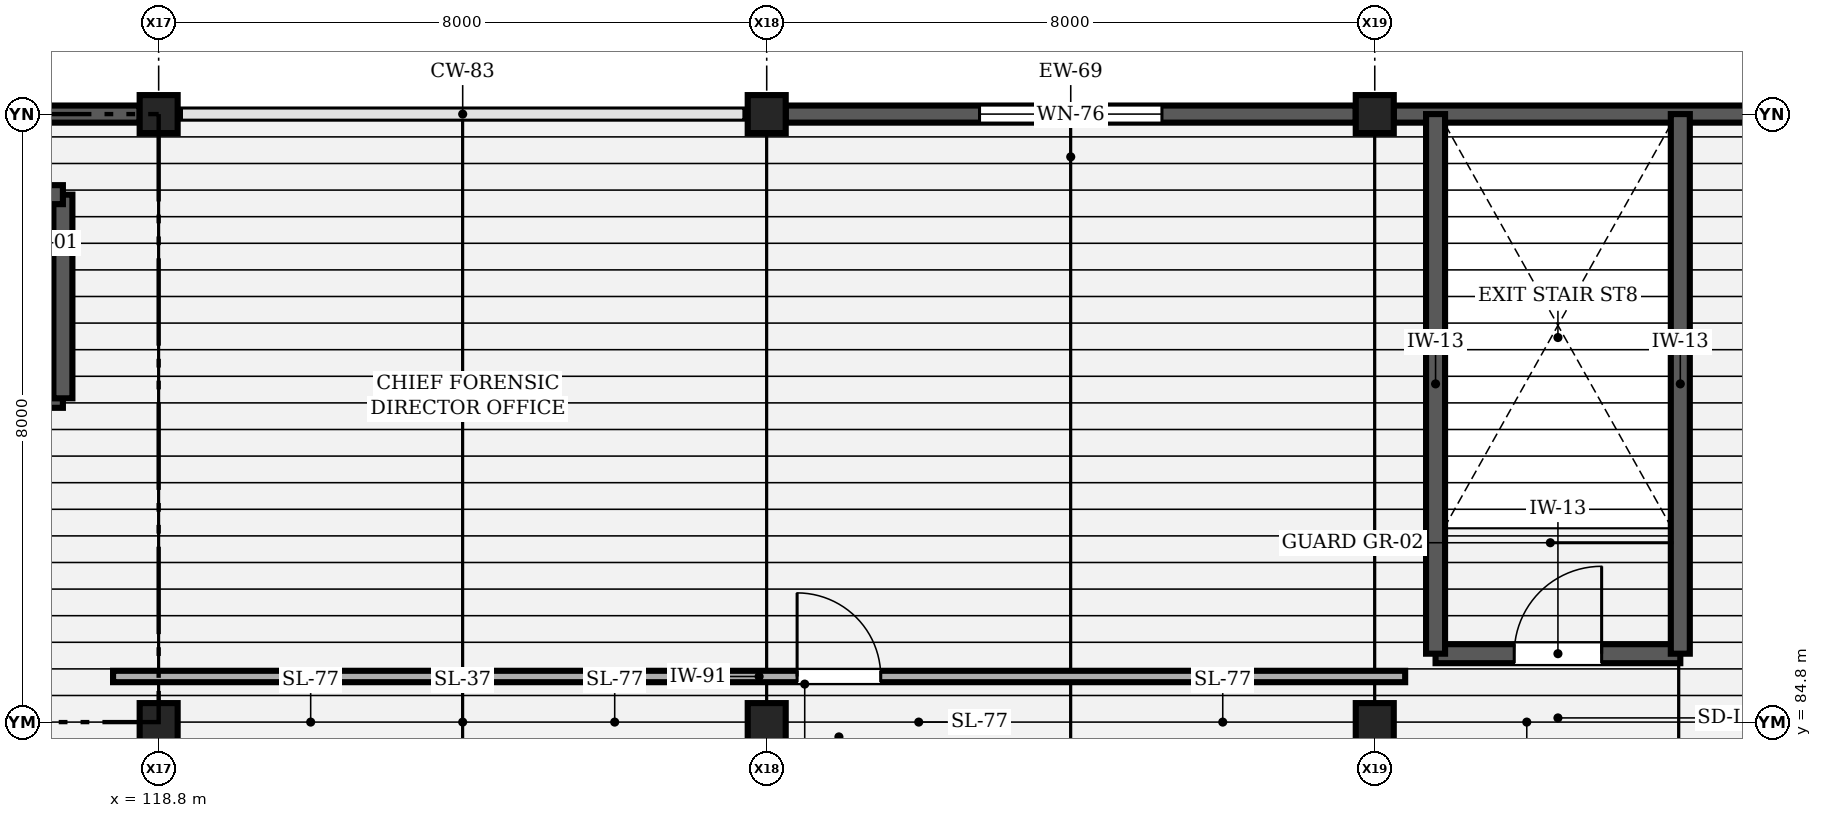
"""IFC4 building model, lengths in metres.
Left out: names, types, materials, properties, quantities, classifications, styles, units other than length and angle.
Written with IfcOpenShell. Run it as: python <this file> out.ifc"""

import sys

from ifc_helpers import new_model, si_unit, direction, frame, frame_2d, origin, origin_2d, place, context, subcontext, project, spatial, rectangle, extrude, element, fill, save


model = new_model("IFC4")
c1 = context("Model", 3, precision=1e-05, world=origin(), true_north=direction((0.0, 1.0)))
c2 = subcontext(c1, "Body", "Model", "MODEL_VIEW")
j1 = project(units=[si_unit("LENGTHUNIT", "METRE"), si_unit("PLANEANGLEUNIT", "RADIAN")], contexts=[c1])
p1 = place(None, origin())
s1 = spatial("IfcSite", under=j1, at=p1, CompositionType="ELEMENT")
p2 = place(p1, origin())
s2 = spatial("IfcBuilding", under=s1, at=p2, CompositionType="ELEMENT")
p3 = place(p2, frame((0.0, 0.0, 18.0)))
s3 = spatial("IfcBuildingStorey", under=s2, at=p3, CompositionType="ELEMENT", Elevation=18.0)
for number, where, z_axis, x_axis in (
    (1, (118.8, 84.8, 0.0), (0.0, 0.0, 1.0), (1.0, 0.0, 0.0)),
    (2, (118.8, 92.8, 0.0), (0.0, 0.0, 1.0), (1.0, 0.0, 0.0)),
    (3, (126.8, 84.8, 0.0), (0.0, 0.0, 1.0), (1.0, 0.0, 0.0)),
    (4, (126.8, 92.8, 0.0), (0.0, 0.0, 1.0), (1.0, 0.0, 0.0)),
    (5, (134.8, 84.8, 0.0), (0.0, 0.0, 1.0), (1.0, 0.0, 0.0)),
    (6, (134.8, 92.8, 0.0), (0.0, 0.0, 1.0), (1.0, 0.0, 0.0)),
):
    element("IfcColumn", number, at=place(p3, frame(where, z_axis=z_axis, x_axis=x_axis)), inside=s3, PredefinedType="COLUMN", context=c2, shape_type="SweptSolid", body=[
        extrude(rectangle(XDim=0.5, YDim=0.5, at=origin_2d()), origin(), (0.0, 0.0, 1.0), 3.9),
    ])
p4 = place(p3, frame((142.55, 92.8, 0.0), z_axis=(0.0, 0.0, 1.0), x_axis=(-1.0, 0.0, 0.0)))
e7 = element("IfcWall", 7, at=p4, inside=s3, PredefinedType="SOLIDWALL", context=c2, shape_type="SweptSolid", body=[
    extrude(rectangle(XDim=7.5, YDim=0.225, at=frame_2d((3.75, 0.0))), origin(), (0.0, 0.0, 1.0), 3.64),
])
p5 = place(p3, frame((134.55, 92.8, 0.0), z_axis=(0.0, 0.0, 1.0), x_axis=(-1.0, 0.0, 0.0)))
e8 = element("IfcWall", 8, at=p5, inside=s3, PredefinedType="SOLIDWALL", context=c2, shape_type="SweptSolid", body=[
    extrude(rectangle(XDim=7.5, YDim=0.225, at=frame_2d((3.75, 0.0))), origin(), (0.0, 0.0, 1.0), 2.98),
])
p6 = place(p5, frame((2.55, 0.0, 0.9)))
e9 = element("IfcOpeningElement", 9, at=p6, cuts=e8, PredefinedType="OPENING", context=c2, shape_type="SweptSolid", body=[
    extrude(rectangle(XDim=2.4, YDim=1.8, at=frame_2d((1.2, 0.9))), frame((0.0, 0.123, 0.0), z_axis=(0.0, -1.0, 0.0), x_axis=(1.0, 0.0, 0.0)), (0.0, 0.0, 1.0), 0.245),
])
p7 = place(p3, frame((118.55, 92.8, 0.0), z_axis=(0.0, 0.0, 1.0), x_axis=(-1.0, 0.0, 0.0)))
e10 = element("IfcWall", 10, at=p7, inside=s3, PredefinedType="SOLIDWALL", context=c2, shape_type="SweptSolid", body=[
    extrude(rectangle(XDim=7.5, YDim=0.225, at=frame_2d((3.75, 0.0))), origin(), (0.0, 0.0, 1.0), 3.64),
])
p8 = place(p3, frame((115.46, 89.06, 0.0), z_axis=(0.0, 0.0, 1.0), x_axis=(1.0, 0.0, 0.0)))
e11 = element("IfcWall", 11, at=p8, inside=s3, PredefinedType="SHEAR", context=c2, shape_type="SweptSolid", body=[
    extrude(rectangle(XDim=2.08, YDim=0.25, at=frame_2d((1.04, 0.0))), origin(), (0.0, 0.0, 1.0), 6.92),
])
p9 = place(p8, frame((0.39, 0.0, 0.0)))
e12 = element("IfcOpeningElement", 12, at=p9, cuts=e11, PredefinedType="OPENING", context=c2, shape_type="SweptSolid", body=[
    extrude(rectangle(XDim=1.3, YDim=2.25, at=frame_2d((0.65, 1.125))), frame((0.0, 0.135, 0.0), z_axis=(0.0, -1.0, 0.0), x_axis=(1.0, 0.0, 0.0)), (0.0, 0.0, 1.0), 0.27),
])
p10 = place(p3, frame((117.54, 89.06, 0.0), z_axis=(0.0, 0.0, 1.0), x_axis=(0.0, 1.0, 0.0)))
e13 = element("IfcWall", 13, at=p10, inside=s3, PredefinedType="SHEAR", context=c2, shape_type="SweptSolid", body=[
    extrude(rectangle(XDim=2.68, YDim=0.25, at=frame_2d((1.34, 0.0))), origin(), (0.0, 0.0, 1.0), 6.92),
])
p11 = place(p3, frame((117.54, 91.74, 0.0), z_axis=(0.0, 0.0, 1.0), x_axis=(-1.0, 0.0, 0.0)))
e14 = element("IfcWall", 14, at=p11, inside=s3, PredefinedType="SHEAR", context=c2, shape_type="SweptSolid", body=[
    extrude(rectangle(XDim=2.08, YDim=0.25, at=frame_2d((1.04, 0.0))), origin(), (0.0, 0.0, 1.0), 6.92),
])
p12 = place(p3, frame((135.6, 85.7, 0.0), z_axis=(0.0, 0.0, 1.0), x_axis=(1.0, 0.0, 0.0)))
e15 = element("IfcWall", 15, at=p12, inside=s3, PredefinedType="SHEAR", context=c2, shape_type="SweptSolid", body=[
    extrude(rectangle(XDim=3.22, YDim=0.25, at=frame_2d((1.61, 0.0))), origin(), (0.0, 0.0, 1.0), 3.9),
])
p13 = place(p12, frame((1.035, 0.0, 0.0)))
e16 = element("IfcOpeningElement", 16, at=p13, cuts=e15, PredefinedType="OPENING", context=c2, shape_type="SweptSolid", body=[
    extrude(rectangle(XDim=1.15, YDim=2.15, at=frame_2d((0.575, 1.075))), frame((0.0, 0.135, 0.0), z_axis=(0.0, -1.0, 0.0), x_axis=(1.0, 0.0, 0.0)), (0.0, 0.0, 1.0), 0.27),
])
for number, where, z_axis, x_axis in (
    (17, (138.82, 85.7, 0.0), (0.0, 0.0, 1.0), (0.0, 1.0, 0.0)),
    (18, (135.6, 92.8, 0.0), (0.0, 0.0, 1.0), (0.0, -1.0, 0.0)),
):
    element("IfcWall", number, at=place(p3, frame(where, z_axis=z_axis, x_axis=x_axis)), inside=s3, PredefinedType="SHEAR", context=c2, shape_type="SweptSolid", body=[
        extrude(rectangle(XDim=7.1, YDim=0.25, at=frame_2d((3.55, 0.0))), origin(), (0.0, 0.0, 1.0), 3.9),
    ])
p14 = place(p3, frame((118.2, 85.4, 0.0), z_axis=(0.0, 0.0, 1.0), x_axis=(1.0, 0.0, 0.0)))
e19 = element("IfcWall", 19, at=p14, inside=s3, PredefinedType="PARTITIONING", context=c2, shape_type="SweptSolid", body=[
    extrude(rectangle(XDim=17.0, YDim=0.15, at=frame_2d((8.5, 0.0))), origin(), (0.0, 0.0, 1.0), 2.765),
])
p15 = place(p14, frame((9.0, 0.0, 0.0)))
e20 = element("IfcOpeningElement", 20, at=p15, cuts=e19, PredefinedType="OPENING", context=c2, shape_type="SweptSolid", body=[
    extrude(rectangle(XDim=1.1, YDim=2.1, at=frame_2d((0.55, 1.05))), frame((0.0, 0.085, 0.0), z_axis=(0.0, -1.0, 0.0), x_axis=(1.0, 0.0, 0.0)), (0.0, 0.0, 1.0), 0.17),
])
p16 = place(p6, origin())
e21 = element("IfcWindow", 21, at=p16, inside=s3, PartitioningType="SINGLE_PANEL", PredefinedType="WINDOW", context=c2, shape_type="SweptSolid", body=[
    extrude(rectangle(XDim=2.4, YDim=1.8, at=frame_2d((1.2, 0.9))), frame((0.0, 0.03, 0.0), z_axis=(0.0, -1.0, 0.0), x_axis=(1.0, 0.0, 0.0)), (0.0, 0.0, 1.0), 0.06),
])
fill(e9, e21)
p17 = place(p13, origin())
e22 = element("IfcDoor", 22, at=p17, inside=s3, OperationType="SINGLE_SWING_RIGHT", PredefinedType="DOOR", context=c2, shape_type="SweptSolid", body=[
    extrude(rectangle(XDim=1.15, YDim=2.15, at=frame_2d((0.575, 1.075))), frame((0.0, 0.025, 0.0), z_axis=(0.0, -1.0, 0.0), x_axis=(1.0, 0.0, 0.0)), (0.0, 0.0, 1.0), 0.05),
])
fill(e16, e22)
p18 = place(p15, origin())
e23 = element("IfcDoor", 23, at=p18, inside=s3, OperationType="SINGLE_SWING_LEFT", PredefinedType="DOOR", context=c2, shape_type="SweptSolid", body=[
    extrude(rectangle(XDim=1.1, YDim=2.1, at=frame_2d((0.55, 1.05))), frame((0.0, 0.025, 0.0), z_axis=(0.0, -1.0, 0.0), x_axis=(1.0, 0.0, 0.0)), (0.0, 0.0, 1.0), 0.05),
])
fill(e20, e23)
save(model, sys.argv[1])
